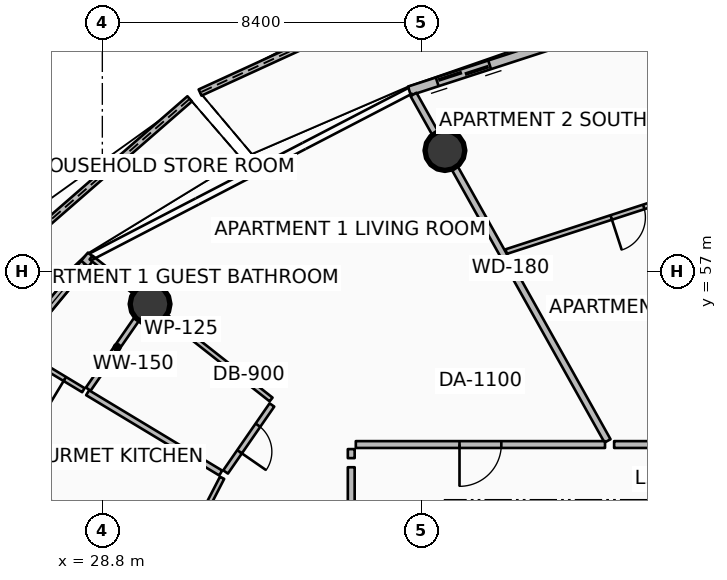
"""IFC4 building model, lengths in metres.
Left out: names, types, materials, properties, quantities, classifications, styles, units other than length and angle.
Written with IfcOpenShell. Run it as: python <this file> out.ifc"""

import sys

from ifc_helpers import new_model, si_unit, direction, frame, frame_2d, origin, origin_2d, place, context, subcontext, project, spatial, polyline, rectangle, circle, outline, extrude, element, fill, save


model = new_model("IFC4")
c1 = context("Model", 3, precision=1e-05, world=origin(), true_north=direction((0.0, 1.0)))
c2 = subcontext(c1, "Body", "Model", "MODEL_VIEW")
j1 = project(units=[si_unit("LENGTHUNIT", "METRE"), si_unit("PLANEANGLEUNIT", "RADIAN")], contexts=[c1])
p1 = place(None, origin())
s1 = spatial("IfcSite", under=j1, at=p1, CompositionType="ELEMENT")
p2 = place(p1, origin())
s2 = spatial("IfcBuilding", under=s1, at=p2, CompositionType="ELEMENT")
p3 = place(p2, frame((0.0, 0.0, 214.05)))
s3 = spatial("IfcBuildingStorey", under=s2, at=p3, CompositionType="ELEMENT", Elevation=214.05)
for number, where, z_axis, x_axis in (
    (1, (37.815, 60.186, 0.0), (0.0, 0.0, 1.0), (1.0, 0.0, 0.0)),
    (2, (30.056, 56.146, 0.0), (0.0, 0.0, 1.0), (1.0, 0.0, 0.0)),
):
    element("IfcColumn", number, at=place(p3, frame(where, z_axis=z_axis, x_axis=x_axis)), inside=s3, PredefinedType="COLUMN", context=c2, shape_type="SweptSolid", body=[
        extrude(circle(Radius=0.525, at=origin_2d()), origin(), (0.0, 0.0, 1.0), 3.5),
    ])
p4 = place(p3, frame((40.161, 65.741, 0.0), z_axis=(0.0, 0.0, 1.0), x_axis=(-0.9090221771, -0.416747743294, 0.0)))
e3 = element("IfcWall", 3, at=p4, inside=s3, PredefinedType="PARAPET", context=c2, shape_type="SweptSolid", body=[
    extrude(outline(polyline([(0.0, 0.0), (9.668, 0.0), (9.668, 1.497), (4.834, 1.696), (0.0, 1.832), (0.0, 0.0)])), frame((0.0, 0.09, 0.0), z_axis=(0.0, -1.0, 0.0), x_axis=(1.0, 0.0, 0.0)), (0.0, 0.0, 1.0), 0.18),
])
p5 = place(p3, frame((31.098, 61.546, 0.0), z_axis=(0.0, 0.0, 1.0), x_axis=(-0.754130048188, -0.65672511024, 0.0)))
e4 = element("IfcWall", 4, at=p5, inside=s3, PredefinedType="PARAPET", context=c2, shape_type="SweptSolid", body=[
    extrude(outline(polyline([(0.0, 0.0), (10.384, 0.0), (10.384, 1.148), (5.192, 1.284), (0.0, 1.483), (0.0, 0.0)])), frame((0.0, 0.09, 0.0), z_axis=(0.0, -1.0, 0.0), x_axis=(1.0, 0.0, 0.0)), (0.0, 0.0, 1.0), 0.18),
])
p6 = place(p3, frame((45.384, 64.519, 0.0), z_axis=(0.0, 0.0, 1.0), x_axis=(-0.951058543936, -0.309010753869, 0.0)))
e5 = element("IfcWall", 5, at=p6, inside=s3, PredefinedType="SOLIDWALL", context=c2, shape_type="SweptSolid", body=[
    extrude(rectangle(XDim=8.942, YDim=0.24, at=frame_2d((4.471, 0.0))), origin(), (0.0, 0.0, 1.0), 2.45),
])
p7 = place(p6, frame((6.722, 0.0, 0.0)))
e6 = element("IfcOpeningElement", 6, at=p7, cuts=e5, PredefinedType="OPENING", context=c2, shape_type="SweptSolid", body=[
    extrude(rectangle(XDim=1.45, YDim=2.15, at=frame_2d((0.725, 1.075))), frame((0.0, 0.13, 0.0), z_axis=(0.0, -1.0, 0.0), x_axis=(1.0, 0.0, 0.0)), (0.0, 0.0, 1.0), 0.26),
])
p8 = place(p6, frame((0.28, 0.0, 0.65)))
e7 = element("IfcOpeningElement", 7, at=p8, cuts=e5, PredefinedType="OPENING", context=c2, shape_type="SweptSolid", body=[
    extrude(rectangle(XDim=1.6, YDim=1.5, at=frame_2d((0.8, 0.75))), frame((0.0, 0.13, 0.0), z_axis=(0.0, -1.0, 0.0), x_axis=(1.0, 0.0, 0.0)), (0.0, 0.0, 1.0), 0.26),
])
p9 = place(p3, frame((28.515, 57.424, 0.0), z_axis=(0.0, 0.0, 1.0), x_axis=(-0.636759394418, -0.771062561418, 0.0)))
e8 = element("IfcWall", 8, at=p9, inside=s3, PredefinedType="SOLIDWALL", context=c2, shape_type="SweptSolid", body=[
    extrude(rectangle(XDim=10.494, YDim=0.24, at=frame_2d((5.247, 0.0))), origin(), (0.0, 0.0, 1.0), 2.45),
])
p10 = place(p9, frame((8.274, 0.0, 0.0)))
e9 = element("IfcOpeningElement", 9, at=p10, cuts=e8, PredefinedType="OPENING", context=c2, shape_type="SweptSolid", body=[
    extrude(rectangle(XDim=1.45, YDim=2.15, at=frame_2d((0.725, 1.075))), frame((0.0, 0.13, 0.0), z_axis=(0.0, -1.0, 0.0), x_axis=(1.0, 0.0, 0.0)), (0.0, 0.0, 1.0), 0.26),
])
p11 = place(p9, frame((0.28, 0.0, 0.65)))
e10 = element("IfcOpeningElement", 10, at=p11, cuts=e8, PredefinedType="OPENING", context=c2, shape_type="SweptSolid", body=[
    extrude(rectangle(XDim=1.6, YDim=1.5, at=frame_2d((0.8, 0.75))), frame((0.0, 0.13, 0.0), z_axis=(0.0, -1.0, 0.0), x_axis=(1.0, 0.0, 0.0)), (0.0, 0.0, 1.0), 0.26),
])
p12 = place(p3, frame((42.094, 52.546, 0.0), z_axis=(0.0, 0.0, 1.0), x_axis=(-0.488614041717, 0.872500039104, 0.0)))
e11 = element("IfcWall", 11, at=p12, inside=s3, PredefinedType="PARTITIONING", context=c2, shape_type="SweptSolid", body=[
    extrude(rectangle(XDim=10.448, YDim=0.18, at=frame_2d((5.224, 0.0))), origin(), (0.0, 0.0, 1.0), 2.94),
])
p13 = place(p3, frame((42.028, 52.45, 0.0), z_axis=(0.0, 0.0, 1.0), x_axis=(-1.0, 0.0, 0.0)))
e12 = element("IfcWall", 12, at=p13, inside=s3, PredefinedType="PARTITIONING", context=c2, shape_type="SweptSolid", body=[
    extrude(rectangle(XDim=6.558, YDim=0.18, at=frame_2d((3.279, 0.0))), origin(), (0.0, 0.0, 1.0), 2.94),
])
p14 = place(p13, frame((2.729, 0.0, 0.0)))
e13 = element("IfcOpeningElement", 13, at=p14, cuts=e12, PredefinedType="OPENING", context=c2, shape_type="SweptSolid", body=[
    extrude(rectangle(XDim=1.1, YDim=2.1, at=frame_2d((0.55, 1.05))), frame((0.0, 0.1, 0.0), z_axis=(0.0, -1.0, 0.0), x_axis=(1.0, 0.0, 0.0)), (0.0, 0.0, 1.0), 0.2),
])
p15 = place(p3, frame((35.35, 52.33, 0.0), z_axis=(0.0, 0.0, 1.0), x_axis=(0.0, -1.0, 0.0)))
e14 = element("IfcWall", 14, at=p15, inside=s3, PredefinedType="PARTITIONING", context=c2, shape_type="SweptSolid", body=[
    extrude(rectangle(XDim=0.238, YDim=0.18, at=frame_2d((0.119, 0.0))), origin(), (0.0, 0.0, 1.0), 2.94),
])
p16 = place(p3, frame((35.35, 51.853, 0.0), z_axis=(0.0, 0.0, 1.0), x_axis=(0.0, -1.0, 0.0)))
e15 = element("IfcWall", 15, at=p16, inside=s3, PredefinedType="PARTITIONING", context=c2, shape_type="SweptSolid", body=[
    extrude(rectangle(XDim=6.165, YDim=0.18, at=frame_2d((3.083, 0.0))), origin(), (0.0, 0.0, 1.0), 2.94),
])
p17 = place(p3, frame((33.241, 53.635, 0.0), z_axis=(0.0, 0.0, 1.0), x_axis=(-0.785321754625, 0.619087830371, 0.0)))
e16 = element("IfcWall", 16, at=p17, inside=s3, PredefinedType="PARTITIONING", context=c2, shape_type="SweptSolid", body=[
    extrude(rectangle(XDim=6.033, YDim=0.125, at=frame_2d((3.017, 0.0))), origin(), (0.0, 0.0, 1.0), 2.94),
])
p18 = place(p3, frame((33.262, 53.491, 0.0), z_axis=(0.0, 0.0, 1.0), x_axis=(-0.568919673568, -0.822393096413, 0.0)))
e17 = element("IfcWall", 17, at=p18, inside=s3, PredefinedType="PARTITIONING", context=c2, shape_type="SweptSolid", body=[
    extrude(rectangle(XDim=2.143, YDim=0.15, at=frame_2d((1.072, 0.0))), origin(), (0.0, 0.0, 1.0), 2.94),
])
p19 = place(p18, frame((0.646, 0.0, 0.0)))
e18 = element("IfcOpeningElement", 18, at=p19, cuts=e17, PredefinedType="OPENING", context=c2, shape_type="SweptSolid", body=[
    extrude(rectangle(XDim=0.85, YDim=2.06, at=frame_2d((0.425, 1.03))), frame((0.0, 0.085, 0.0), z_axis=(0.0, -1.0, 0.0), x_axis=(1.0, 0.0, 0.0)), (0.0, 0.0, 1.0), 0.17),
])
p20 = place(p3, frame((29.948, 56.104, 0.0), z_axis=(0.0, 0.0, 1.0), x_axis=(-0.568843740651, -0.822445620526, 0.0)))
e19 = element("IfcWall", 19, at=p20, inside=s3, PredefinedType="PARTITIONING", context=c2, shape_type="SweptSolid", body=[
    extrude(rectangle(XDim=2.669, YDim=0.15, at=frame_2d((1.335, 0.0))), origin(), (0.0, 0.0, 1.0), 2.94),
])
p21 = place(p3, frame((31.915, 51.701, 0.0), z_axis=(0.0, 0.0, 1.0), x_axis=(-0.856305556185, 0.516469548422, 0.0)))
e20 = element("IfcWall", 20, at=p21, inside=s3, PredefinedType="PARTITIONING", context=c2, shape_type="SweptSolid", body=[
    extrude(rectangle(XDim=4.09, YDim=0.15, at=frame_2d((2.045, 0.0))), origin(), (0.0, 0.0, 1.0), 2.94),
])
p22 = place(p3, frame((28.302, 53.881, 0.0), z_axis=(0.0, 0.0, 1.0), x_axis=(-0.856354175531, 0.516388929056, 0.0)))
e21 = element("IfcWall", 21, at=p22, inside=s3, PredefinedType="PARTITIONING", context=c2, shape_type="SweptSolid", body=[
    extrude(rectangle(XDim=1.99, YDim=0.125, at=frame_2d((0.995, 0.0))), origin(), (0.0, 0.0, 1.0), 2.94),
])
p23 = place(p22, frame((0.57, 0.0, 0.0)))
e22 = element("IfcOpeningElement", 22, at=p23, cuts=e21, PredefinedType="OPENING", context=c2, shape_type="SweptSolid", body=[
    extrude(rectangle(XDim=0.85, YDim=2.06, at=frame_2d((0.425, 1.03))), frame((0.0, 0.073, 0.0), z_axis=(0.0, -1.0, 0.0), x_axis=(1.0, 0.0, 0.0)), (0.0, 0.0, 1.0), 0.145),
])
p24 = place(p3, frame((30.764, 49.467, 0.0), z_axis=(0.0, 0.0, 1.0), x_axis=(-0.917605566125, 0.397492169755, 0.0)))
e23 = element("IfcWall", 23, at=p24, inside=s3, PredefinedType="PARTITIONING", context=c2, shape_type="SweptSolid", body=[
    extrude(rectangle(XDim=6.955, YDim=0.125, at=frame_2d((3.477, 0.0))), origin(), (0.0, 0.0, 1.0), 2.94),
])
p25 = place(p3, frame((31.951, 51.575, 0.0), z_axis=(0.0, 0.0, 1.0), x_axis=(-0.458029312051, -0.88893708962, 0.0)))
e24 = element("IfcWall", 24, at=p25, inside=s3, PredefinedType="PARTITIONING", context=c2, shape_type="SweptSolid", body=[
    extrude(rectangle(XDim=2.332, YDim=0.125, at=frame_2d((1.166, 0.0))), origin(), (0.0, 0.0, 1.0), 2.94),
])
p26 = place(p25, frame((0.741, 0.0, 0.0)))
e25 = element("IfcOpeningElement", 25, at=p26, cuts=e24, PredefinedType="OPENING", context=c2, shape_type="SweptSolid", body=[
    extrude(rectangle(XDim=0.85, YDim=2.06, at=frame_2d((0.425, 1.03))), frame((0.0, 0.073, 0.0), z_axis=(0.0, -1.0, 0.0), x_axis=(1.0, 0.0, 0.0)), (0.0, 0.0, 1.0), 0.145),
])
p27 = place(p3, frame((46.643, 52.45, 0.0), z_axis=(0.0, 0.0, 1.0), x_axis=(-1.0, 0.0, 0.0)))
e26 = element("IfcWall", 26, at=p27, inside=s3, PredefinedType="PARTITIONING", context=c2, shape_type="SweptSolid", body=[
    extrude(rectangle(XDim=4.376, YDim=0.18, at=frame_2d((2.188, 0.0))), origin(), (0.0, 0.0, 1.0), 2.94),
])
p28 = place(p3, frame((45.808, 59.6, 0.0), z_axis=(0.0, 0.0, 1.0), x_axis=(-0.951057868445, -0.309012832854, 0.0)))
e27 = element("IfcWall", 27, at=p28, inside=s3, PredefinedType="PARTITIONING", context=c2, shape_type="SweptSolid", body=[
    extrude(rectangle(XDim=6.708, YDim=0.125, at=frame_2d((3.354, 0.0))), origin(), (0.0, 0.0, 1.0), 2.94),
])
p29 = place(p28, frame((2.904, 0.0, 0.0)))
e28 = element("IfcOpeningElement", 28, at=p29, cuts=e27, PredefinedType="OPENING", context=c2, shape_type="SweptSolid", body=[
    extrude(rectangle(XDim=0.9, YDim=2.08, at=frame_2d((0.45, 1.04))), frame((0.0, 0.073, 0.0), z_axis=(0.0, -1.0, 0.0), x_axis=(1.0, 0.0, 0.0)), (0.0, 0.0, 1.0), 0.145),
])
p30 = place(p7, origin())
e29 = element("IfcDoor", 29, at=p30, inside=s3, OperationType="DOUBLE_DOOR_SLIDING", PredefinedType="DOOR", context=c2, shape_type="SweptSolid", body=[
    extrude(rectangle(XDim=1.45, YDim=2.15, at=frame_2d((0.725, 1.075))), frame((0.0, 0.025, 0.0), z_axis=(0.0, -1.0, 0.0), x_axis=(1.0, 0.0, 0.0)), (0.0, 0.0, 1.0), 0.05),
])
fill(e6, e29)
p31 = place(p11, origin())
e30 = element("IfcWindow", 30, at=p31, inside=s3, PartitioningType="SINGLE_PANEL", PredefinedType="WINDOW", context=c2, shape_type="SweptSolid", body=[
    extrude(rectangle(XDim=1.6, YDim=1.5, at=frame_2d((0.8, 0.75))), frame((0.0, 0.03, 0.0), z_axis=(0.0, -1.0, 0.0), x_axis=(1.0, 0.0, 0.0)), (0.0, 0.0, 1.0), 0.06),
])
fill(e10, e30)
p32 = place(p14, origin())
e31 = element("IfcDoor", 31, at=p32, inside=s3, OperationType="SINGLE_SWING_RIGHT", PredefinedType="DOOR", context=c2, shape_type="SweptSolid", body=[
    extrude(rectangle(XDim=1.1, YDim=2.1, at=frame_2d((0.55, 1.05))), frame((0.0, 0.025, 0.0), z_axis=(0.0, -1.0, 0.0), x_axis=(1.0, 0.0, 0.0)), (0.0, 0.0, 1.0), 0.05),
])
fill(e13, e31)
p33 = place(p19, origin())
e32 = element("IfcDoor", 32, at=p33, inside=s3, OperationType="SINGLE_SWING_RIGHT", PredefinedType="DOOR", context=c2, shape_type="SweptSolid", body=[
    extrude(rectangle(XDim=0.85, YDim=2.06, at=frame_2d((0.425, 1.03))), frame((0.0, 0.025, 0.0), z_axis=(0.0, -1.0, 0.0), x_axis=(1.0, 0.0, 0.0)), (0.0, 0.0, 1.0), 0.05),
])
fill(e18, e32)
p34 = place(p23, origin())
e33 = element("IfcDoor", 33, at=p34, inside=s3, OperationType="SINGLE_SWING_LEFT", PredefinedType="DOOR", context=c2, shape_type="SweptSolid", body=[
    extrude(rectangle(XDim=0.85, YDim=2.06, at=frame_2d((0.425, 1.03))), frame((0.0, 0.025, 0.0), z_axis=(0.0, -1.0, 0.0), x_axis=(1.0, 0.0, 0.0)), (0.0, 0.0, 1.0), 0.05),
])
fill(e22, e33)
p35 = place(p29, origin())
e34 = element("IfcDoor", 34, at=p35, inside=s3, OperationType="SINGLE_SWING_RIGHT", PredefinedType="DOOR", context=c2, shape_type="SweptSolid", body=[
    extrude(rectangle(XDim=0.9, YDim=2.08, at=frame_2d((0.45, 1.04))), frame((0.0, 0.025, 0.0), z_axis=(0.0, -1.0, 0.0), x_axis=(1.0, 0.0, 0.0)), (0.0, 0.0, 1.0), 0.05),
])
fill(e28, e34)
save(model, sys.argv[1])
